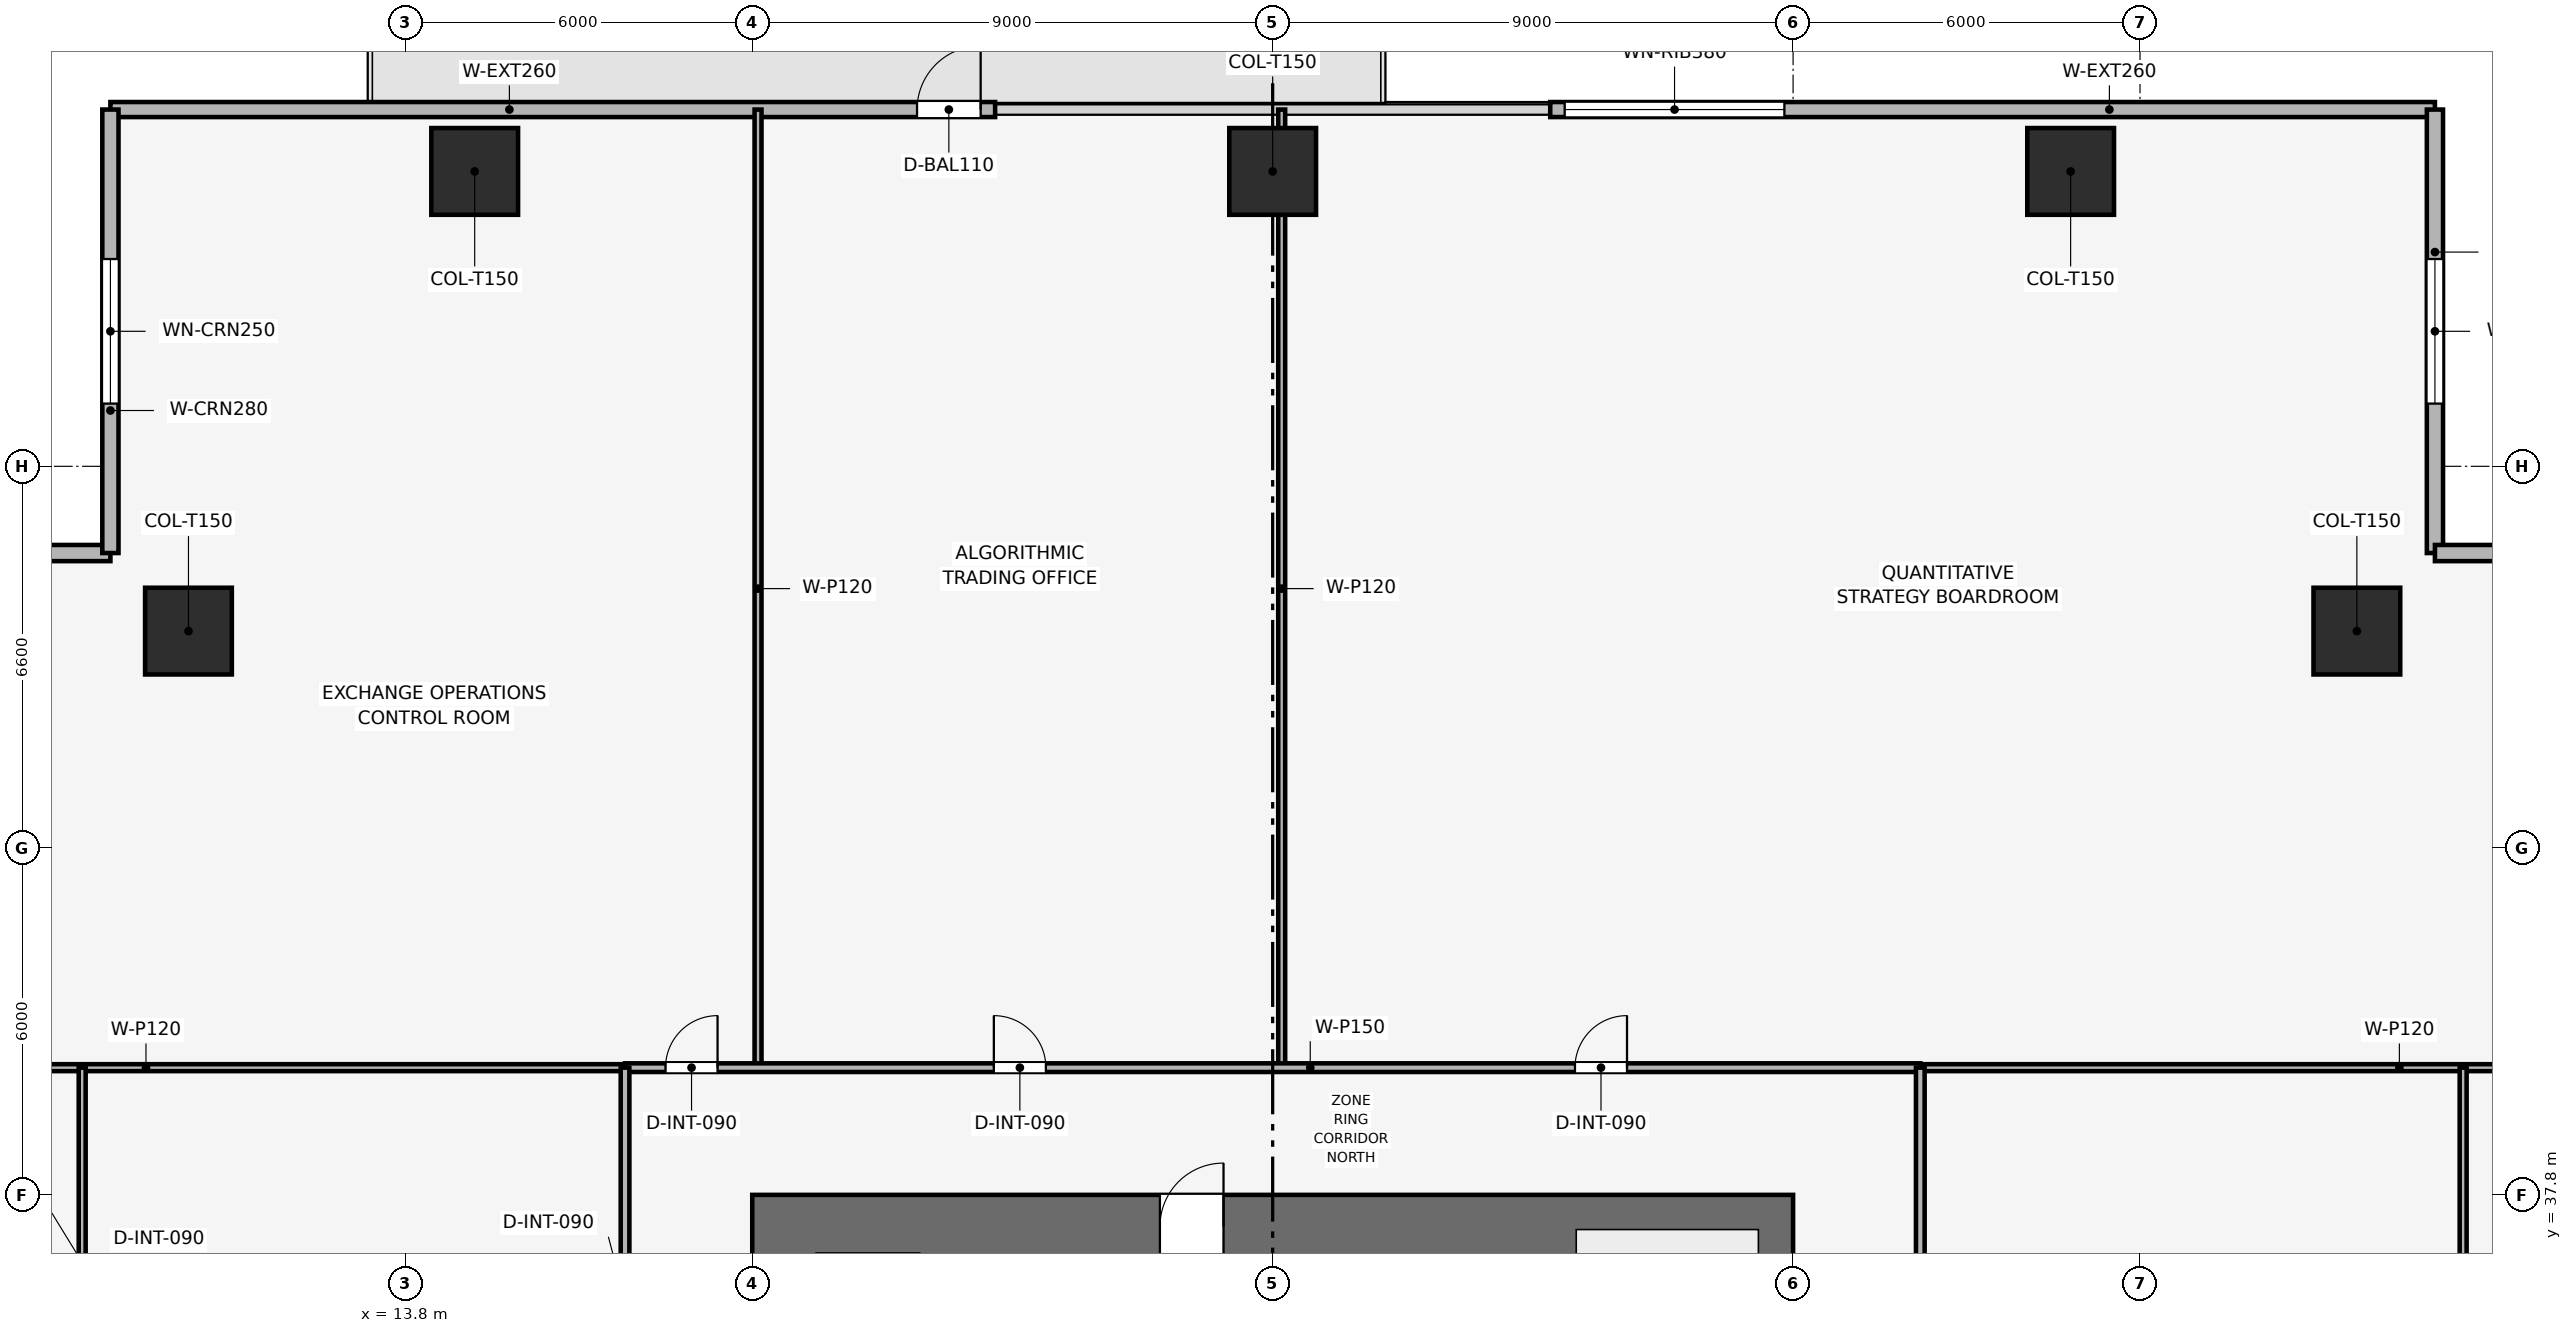
"""IFC4 building model, lengths in metres.
Left out: names, types, materials, properties, quantities, classifications, styles, units other than length and angle.
Written with IfcOpenShell. Run it as: python <this file> out.ifc"""

import sys

from ifc_helpers import new_model, si_unit, direction, frame, frame_2d, origin, origin_2d, place, context, subcontext, project, spatial, rectangle, extrude, element, fill, save


model = new_model("IFC4")
c1 = context("Model", 3, precision=1e-05, world=origin(), true_north=direction((0.0, 1.0)))
c2 = subcontext(c1, "Body", "Model", "MODEL_VIEW")
j1 = project(units=[si_unit("LENGTHUNIT", "METRE"), si_unit("PLANEANGLEUNIT", "RADIAN")], contexts=[c1])
p1 = place(None, origin())
s1 = spatial("IfcSite", under=j1, at=p1, CompositionType="ELEMENT")
p2 = place(p1, origin())
s2 = spatial("IfcBuilding", under=s1, at=p2, CompositionType="ELEMENT")
p3 = place(p2, frame((0.0, 0.0, 80.7)))
s3 = spatial("IfcBuildingStorey", under=s2, at=p3, CompositionType="ELEMENT", Elevation=80.7)
p4 = place(p3, frame((19.8, 37.25, 0.0), z_axis=(0.0, 0.0, 1.0), x_axis=(1.0, 0.0, 0.0)))
e1 = element("IfcWall", 1, at=p4, inside=s3, PredefinedType="SHEAR", context=c2, shape_type="SweptSolid", body=[
    extrude(rectangle(XDim=18.0, YDim=1.1, at=frame_2d((9.0, 0.0))), origin(), (0.0, 0.0, 1.0), 3.9),
])
p5 = place(p4, frame((7.05, 0.0, 0.0)))
e2 = element("IfcOpeningElement", 2, at=p5, cuts=e1, PredefinedType="OPENING", context=c2, shape_type="SweptSolid", body=[
    extrude(rectangle(XDim=1.1, YDim=2.15, at=frame_2d((0.55, 1.075))), frame((0.0, 0.56, 0.0), z_axis=(0.0, -1.0, 0.0), x_axis=(1.0, 0.0, 0.0)), (0.0, 0.0, 1.0), 1.12),
])
for number, where, z_axis, x_axis in (
    (3, (42.6, 55.5, 0.003), (0.0, 0.0, 1.0), (1.0, 0.0, 0.0)),
    (4, (28.8, 55.5, 0.003), (0.0, 0.0, 1.0), (1.0, 0.0, 0.0)),
    (5, (15.0, 55.5, 0.003), (0.0, 0.0, 1.0), (1.0, 0.0, 0.0)),
    (6, (47.55, 47.55, 0.003), (0.0, 0.0, 1.0), (1.0, 0.0, 0.0)),
    (7, (10.05, 47.55, 0.003), (0.0, 0.0, 1.0), (1.0, 0.0, 0.0)),
):
    element("IfcColumn", number, at=place(p3, frame(where, z_axis=z_axis, x_axis=x_axis)), inside=s3, PredefinedType="COLUMN", context=c2, shape_type="SweptSolid", body=[
        extrude(rectangle(XDim=1.5, YDim=1.5, at=origin_2d()), origin(), (0.0, 0.0, 1.0), 3.644),
    ])
p6 = place(p3, frame((8.7, 56.57, 0.0), z_axis=(0.0, 0.0, 1.0), x_axis=(1.0, 0.0, 0.0)))
e8 = element("IfcWall", 8, at=p6, inside=s3, PredefinedType="SOLIDWALL", context=c2, shape_type="SweptSolid", body=[
    extrude(rectangle(XDim=15.3, YDim=0.26, at=frame_2d((7.65, 0.0))), origin(), (0.0, 0.0, 1.0), 3.65),
])
p7 = place(p6, frame((13.95, 0.0, 0.0)))
e9 = element("IfcOpeningElement", 9, at=p7, cuts=e8, PredefinedType="OPENING", context=c2, shape_type="SweptSolid", body=[
    extrude(rectangle(XDim=1.1, YDim=2.2, at=frame_2d((0.55, 1.1))), frame((0.0, 0.14, 0.0), z_axis=(0.0, -1.0, 0.0), x_axis=(1.0, 0.0, 0.0)), (0.0, 0.0, 1.0), 0.28),
])
p8 = place(p3, frame((33.6, 56.57, 0.0), z_axis=(0.0, 0.0, 1.0), x_axis=(1.0, 0.0, 0.0)))
e10 = element("IfcWall", 10, at=p8, inside=s3, PredefinedType="SOLIDWALL", context=c2, shape_type="SweptSolid", body=[
    extrude(rectangle(XDim=15.3, YDim=0.26, at=frame_2d((7.65, 0.0))), origin(), (0.0, 0.0, 1.0), 3.65),
])
p9 = place(p8, frame((0.25, 0.0, 0.9)))
e11 = element("IfcOpeningElement", 11, at=p9, cuts=e10, PredefinedType="OPENING", context=c2, shape_type="SweptSolid", body=[
    extrude(rectangle(XDim=3.8, YDim=1.9, at=frame_2d((1.9, 0.95))), frame((0.0, 0.14, 0.0), z_axis=(0.0, -1.0, 0.0), x_axis=(1.0, 0.0, 0.0)), (0.0, 0.0, 1.0), 0.28),
])
p10 = place(p3, frame((1.03, 48.9, 0.0), z_axis=(0.0, 0.0, 1.0), x_axis=(1.0, 0.0, 0.0)))
e12 = element("IfcWall", 12, at=p10, inside=s3, PredefinedType="SOLIDWALL", context=c2, shape_type="SweptSolid", body=[
    extrude(rectangle(XDim=7.67, YDim=0.28, at=frame_2d((3.835, 0.0))), origin(), (0.0, 0.0, 1.0), 3.65),
])
p11 = place(p10, frame((2.585, 0.0, 0.9)))
e13 = element("IfcOpeningElement", 13, at=p11, cuts=e12, PredefinedType="OPENING", context=c2, shape_type="SweptSolid", body=[
    extrude(rectangle(XDim=2.5, YDim=1.9, at=frame_2d((1.25, 0.95))), frame((0.0, 0.15, 0.0), z_axis=(0.0, -1.0, 0.0), x_axis=(1.0, 0.0, 0.0)), (0.0, 0.0, 1.0), 0.3),
])
p12 = place(p3, frame((8.7, 48.9, 0.0), z_axis=(0.0, 0.0, 1.0), x_axis=(0.0, 1.0, 0.0)))
e14 = element("IfcWall", 14, at=p12, inside=s3, PredefinedType="SOLIDWALL", context=c2, shape_type="SweptSolid", body=[
    extrude(rectangle(XDim=7.67, YDim=0.28, at=frame_2d((3.835, 0.0))), origin(), (0.0, 0.0, 1.0), 3.65),
])
p13 = place(p12, frame((2.585, 0.0, 0.9)))
e15 = element("IfcOpeningElement", 15, at=p13, cuts=e14, PredefinedType="OPENING", context=c2, shape_type="SweptSolid", body=[
    extrude(rectangle(XDim=2.5, YDim=1.9, at=frame_2d((1.25, 0.95))), frame((0.0, 0.15, 0.0), z_axis=(0.0, -1.0, 0.0), x_axis=(1.0, 0.0, 0.0)), (0.0, 0.0, 1.0), 0.3),
])
p14 = place(p3, frame((48.9, 56.57, 0.0), z_axis=(0.0, 0.0, 1.0), x_axis=(0.0, -1.0, 0.0)))
e16 = element("IfcWall", 16, at=p14, inside=s3, PredefinedType="SOLIDWALL", context=c2, shape_type="SweptSolid", body=[
    extrude(rectangle(XDim=7.67, YDim=0.28, at=frame_2d((3.835, 0.0))), origin(), (0.0, 0.0, 1.0), 3.65),
])
p15 = place(p14, frame((2.585, 0.0, 0.9)))
e17 = element("IfcOpeningElement", 17, at=p15, cuts=e16, PredefinedType="OPENING", context=c2, shape_type="SweptSolid", body=[
    extrude(rectangle(XDim=2.5, YDim=1.9, at=frame_2d((1.25, 0.95))), frame((0.0, 0.15, 0.0), z_axis=(0.0, -1.0, 0.0), x_axis=(1.0, 0.0, 0.0)), (0.0, 0.0, 1.0), 0.3),
])
p16 = place(p3, frame((48.9, 48.9, 0.0), z_axis=(0.0, 0.0, 1.0), x_axis=(1.0, 0.0, 0.0)))
e18 = element("IfcWall", 18, at=p16, inside=s3, PredefinedType="SOLIDWALL", context=c2, shape_type="SweptSolid", body=[
    extrude(rectangle(XDim=7.67, YDim=0.28, at=frame_2d((3.835, 0.0))), origin(), (0.0, 0.0, 1.0), 3.65),
])
p17 = place(p16, frame((2.585, 0.0, 0.9)))
e19 = element("IfcOpeningElement", 19, at=p17, cuts=e18, PredefinedType="OPENING", context=c2, shape_type="SweptSolid", body=[
    extrude(rectangle(XDim=2.5, YDim=1.9, at=frame_2d((1.25, 0.95))), frame((0.0, 0.15, 0.0), z_axis=(0.0, -1.0, 0.0), x_axis=(1.0, 0.0, 0.0)), (0.0, 0.0, 1.0), 0.3),
])
for number, where, z_axis, x_axis in (
    (20, (19.9, 40.0, 0.0), (0.0, 0.0, 1.0), (0.0, 1.0, 0.0)),
    (21, (28.956, 40.0, 0.0), (0.0, 0.0, 1.0), (0.0, 1.0, 0.0)),
    (22, (1.03, 40.0, 0.0), (0.0, 0.0, 1.0), (1.0, 0.0, 0.0)),
    (23, (40.0, 40.0, 0.0), (0.0, 0.0, 1.0), (1.0, 0.0, 0.0)),
):
    element("IfcWall", number, at=place(p3, frame(where, z_axis=z_axis, x_axis=x_axis)), inside=s3, PredefinedType="PARTITIONING", context=c2, shape_type="SweptSolid", body=[
        extrude(rectangle(XDim=16.57, YDim=0.12, at=frame_2d((8.285, 0.0))), origin(), (0.0, 0.0, 1.0), 2.935),
    ])
p18 = place(p3, frame((8.212, 31.962, 0.0), z_axis=(0.0, 0.0, 1.0), x_axis=(0.0, 1.0, 0.0)))
e24 = element("IfcWall", 24, at=p18, inside=s3, PredefinedType="PARTITIONING", context=c2, shape_type="SweptSolid", body=[
    extrude(rectangle(XDim=8.038, YDim=0.12, at=frame_2d((4.019, 0.0))), origin(), (0.0, 0.0, 1.0), 3.085),
])
p19 = place(p18, frame((3.288, 0.0, 0.0)))
e25 = element("IfcOpeningElement", 25, at=p19, cuts=e24, PredefinedType="OPENING", context=c2, shape_type="SweptSolid", body=[
    extrude(rectangle(XDim=0.9, YDim=2.1, at=frame_2d((0.45, 1.05))), frame((0.0, 0.07, 0.0), z_axis=(0.0, -1.0, 0.0), x_axis=(1.0, 0.0, 0.0)), (0.0, 0.0, 1.0), 0.14),
])
p20 = place(p3, frame((49.388, 17.6, 0.0), z_axis=(0.0, 0.0, 1.0), x_axis=(0.0, 1.0, 0.0)))
e26 = element("IfcWall", 26, at=p20, inside=s3, PredefinedType="PARTITIONING", context=c2, shape_type="SweptSolid", body=[
    extrude(rectangle(XDim=22.4, YDim=0.12, at=frame_2d((11.2, 0.0))), origin(), (0.0, 0.0, 1.0), 3.085),
])
p21 = place(p20, frame((17.783, 0.0, 0.0)))
e27 = element("IfcOpeningElement", 27, at=p21, cuts=e26, PredefinedType="OPENING", context=c2, shape_type="SweptSolid", body=[
    extrude(rectangle(XDim=0.9, YDim=2.1, at=frame_2d((0.45, 1.05))), frame((0.0, 0.07, 0.0), z_axis=(0.0, -1.0, 0.0), x_axis=(1.0, 0.0, 0.0)), (0.0, 0.0, 1.0), 0.14),
])
p22 = place(p3, frame((17.6, 40.0, 0.0), z_axis=(0.0, 0.0, 1.0), x_axis=(1.0, 0.0, 0.0)))
e28 = element("IfcWall", 28, at=p22, inside=s3, PredefinedType="PARTITIONING", context=c2, shape_type="SweptSolid", body=[
    extrude(rectangle(XDim=22.4, YDim=0.15, at=frame_2d((11.2, 0.0))), origin(), (0.0, 0.0, 1.0), 3.085),
])
p23 = place(p22, frame((0.7, 0.0, 0.0)))
e29 = element("IfcOpeningElement", 29, at=p23, cuts=e28, PredefinedType="OPENING", context=c2, shape_type="SweptSolid", body=[
    extrude(rectangle(XDim=0.9, YDim=2.1, at=frame_2d((0.45, 1.05))), frame((0.0, 0.085, 0.0), z_axis=(0.0, -1.0, 0.0), x_axis=(1.0, 0.0, 0.0)), (0.0, 0.0, 1.0), 0.17),
])
p24 = place(p22, frame((6.378, 0.0, 0.0)))
e30 = element("IfcOpeningElement", 30, at=p24, cuts=e28, PredefinedType="OPENING", context=c2, shape_type="SweptSolid", body=[
    extrude(rectangle(XDim=0.9, YDim=2.1, at=frame_2d((0.45, 1.05))), frame((0.0, 0.085, 0.0), z_axis=(0.0, -1.0, 0.0), x_axis=(1.0, 0.0, 0.0)), (0.0, 0.0, 1.0), 0.17),
])
p25 = place(p22, frame((16.428, 0.0, 0.0)))
e31 = element("IfcOpeningElement", 31, at=p25, cuts=e28, PredefinedType="OPENING", context=c2, shape_type="SweptSolid", body=[
    extrude(rectangle(XDim=0.9, YDim=2.1, at=frame_2d((0.45, 1.05))), frame((0.0, 0.085, 0.0), z_axis=(0.0, -1.0, 0.0), x_axis=(1.0, 0.0, 0.0)), (0.0, 0.0, 1.0), 0.17),
])
p26 = place(p3, frame((17.6, 17.6, 0.0), z_axis=(0.0, 0.0, 1.0), x_axis=(0.0, 1.0, 0.0)))
e32 = element("IfcWall", 32, at=p26, inside=s3, PredefinedType="PARTITIONING", context=c2, shape_type="SweptSolid", body=[
    extrude(rectangle(XDim=22.4, YDim=0.15, at=frame_2d((11.2, 0.0))), origin(), (0.0, 0.0, 1.0), 3.085),
])
p27 = place(p26, frame((0.707, 0.0, 0.0)))
e33 = element("IfcOpeningElement", 33, at=p27, cuts=e32, PredefinedType="OPENING", context=c2, shape_type="SweptSolid", body=[
    extrude(rectangle(XDim=0.9, YDim=2.1, at=frame_2d((0.45, 1.05))), frame((0.0, 0.085, 0.0), z_axis=(0.0, -1.0, 0.0), x_axis=(1.0, 0.0, 0.0)), (0.0, 0.0, 1.0), 0.17),
])
p28 = place(p26, frame((4.745, 0.0, 0.0)))
e34 = element("IfcOpeningElement", 34, at=p28, cuts=e32, PredefinedType="OPENING", context=c2, shape_type="SweptSolid", body=[
    extrude(rectangle(XDim=0.9, YDim=2.1, at=frame_2d((0.45, 1.05))), frame((0.0, 0.085, 0.0), z_axis=(0.0, -1.0, 0.0), x_axis=(1.0, 0.0, 0.0)), (0.0, 0.0, 1.0), 0.17),
])
p29 = place(p26, frame((10.769, 0.0, 0.0)))
e35 = element("IfcOpeningElement", 35, at=p29, cuts=e32, PredefinedType="OPENING", context=c2, shape_type="SweptSolid", body=[
    extrude(rectangle(XDim=0.9, YDim=2.1, at=frame_2d((0.45, 1.05))), frame((0.0, 0.085, 0.0), z_axis=(0.0, -1.0, 0.0), x_axis=(1.0, 0.0, 0.0)), (0.0, 0.0, 1.0), 0.17),
])
p30 = place(p26, frame((17.931, 0.0, 0.0)))
e36 = element("IfcOpeningElement", 36, at=p30, cuts=e32, PredefinedType="OPENING", context=c2, shape_type="SweptSolid", body=[
    extrude(rectangle(XDim=0.9, YDim=2.1, at=frame_2d((0.45, 1.05))), frame((0.0, 0.085, 0.0), z_axis=(0.0, -1.0, 0.0), x_axis=(1.0, 0.0, 0.0)), (0.0, 0.0, 1.0), 0.17),
])
p31 = place(p3, frame((40.0, 17.6, 0.0), z_axis=(0.0, 0.0, 1.0), x_axis=(0.0, 1.0, 0.0)))
e37 = element("IfcWall", 37, at=p31, inside=s3, PredefinedType="PARTITIONING", context=c2, shape_type="SweptSolid", body=[
    extrude(rectangle(XDim=22.4, YDim=0.15, at=frame_2d((11.2, 0.0))), origin(), (0.0, 0.0, 1.0), 3.085),
])
p32 = place(p31, frame((10.75, 0.0, 0.0)))
e38 = element("IfcOpeningElement", 38, at=p32, cuts=e37, PredefinedType="OPENING", context=c2, shape_type="SweptSolid", body=[
    extrude(rectangle(XDim=0.9, YDim=2.1, at=frame_2d((0.45, 1.05))), frame((0.0, 0.085, 0.0), z_axis=(0.0, -1.0, 0.0), x_axis=(1.0, 0.0, 0.0)), (0.0, 0.0, 1.0), 0.17),
])
p33 = place(p7, origin())
e39 = element("IfcDoor", 39, at=p33, inside=s3, OperationType="SINGLE_SWING_RIGHT", PredefinedType="DOOR", context=c2, shape_type="SweptSolid", body=[
    extrude(rectangle(XDim=1.1, YDim=2.2, at=frame_2d((0.55, 1.1))), frame((0.0, 0.025, 0.0), z_axis=(0.0, -1.0, 0.0), x_axis=(1.0, 0.0, 0.0)), (0.0, 0.0, 1.0), 0.05),
])
fill(e9, e39)
p34 = place(p9, origin())
e40 = element("IfcWindow", 40, at=p34, inside=s3, PartitioningType="SINGLE_PANEL", PredefinedType="WINDOW", context=c2, shape_type="SweptSolid", body=[
    extrude(rectangle(XDim=3.8, YDim=1.9, at=frame_2d((1.9, 0.95))), frame((0.0, 0.03, 0.0), z_axis=(0.0, -1.0, 0.0), x_axis=(1.0, 0.0, 0.0)), (0.0, 0.0, 1.0), 0.06),
])
fill(e11, e40)
p35 = place(p13, origin())
e41 = element("IfcWindow", 41, at=p35, inside=s3, PartitioningType="SINGLE_PANEL", PredefinedType="WINDOW", context=c2, shape_type="SweptSolid", body=[
    extrude(rectangle(XDim=2.5, YDim=1.9, at=frame_2d((1.25, 0.95))), frame((0.0, 0.03, 0.0), z_axis=(0.0, -1.0, 0.0), x_axis=(1.0, 0.0, 0.0)), (0.0, 0.0, 1.0), 0.06),
])
fill(e15, e41)
p36 = place(p15, origin())
e42 = element("IfcWindow", 42, at=p36, inside=s3, PartitioningType="SINGLE_PANEL", PredefinedType="WINDOW", context=c2, shape_type="SweptSolid", body=[
    extrude(rectangle(XDim=2.5, YDim=1.9, at=frame_2d((1.25, 0.95))), frame((0.0, 0.03, 0.0), z_axis=(0.0, -1.0, 0.0), x_axis=(1.0, 0.0, 0.0)), (0.0, 0.0, 1.0), 0.06),
])
fill(e17, e42)
p37 = place(p23, origin())
e43 = element("IfcDoor", 43, at=p37, inside=s3, OperationType="SINGLE_SWING_RIGHT", PredefinedType="DOOR", context=c2, shape_type="SweptSolid", body=[
    extrude(rectangle(XDim=0.9, YDim=2.1, at=frame_2d((0.45, 1.05))), frame((0.0, 0.025, 0.0), z_axis=(0.0, -1.0, 0.0), x_axis=(1.0, 0.0, 0.0)), (0.0, 0.0, 1.0), 0.05),
])
fill(e29, e43)
p38 = place(p24, origin())
e44 = element("IfcDoor", 44, at=p38, inside=s3, OperationType="SINGLE_SWING_LEFT", PredefinedType="DOOR", context=c2, shape_type="SweptSolid", body=[
    extrude(rectangle(XDim=0.9, YDim=2.1, at=frame_2d((0.45, 1.05))), frame((0.0, 0.025, 0.0), z_axis=(0.0, -1.0, 0.0), x_axis=(1.0, 0.0, 0.0)), (0.0, 0.0, 1.0), 0.05),
])
fill(e30, e44)
p39 = place(p25, origin())
e45 = element("IfcDoor", 45, at=p39, inside=s3, OperationType="SINGLE_SWING_RIGHT", PredefinedType="DOOR", context=c2, shape_type="SweptSolid", body=[
    extrude(rectangle(XDim=0.9, YDim=2.1, at=frame_2d((0.45, 1.05))), frame((0.0, 0.025, 0.0), z_axis=(0.0, -1.0, 0.0), x_axis=(1.0, 0.0, 0.0)), (0.0, 0.0, 1.0), 0.05),
])
fill(e31, e45)
p40 = place(p5, origin())
e46 = element("IfcDoor", 46, at=p40, inside=s3, OperationType="SINGLE_SWING_RIGHT", PredefinedType="DOOR", context=c2, shape_type="SweptSolid", body=[
    extrude(rectangle(XDim=1.1, YDim=2.15, at=frame_2d((0.55, 1.075))), frame((0.0, 0.025, 0.0), z_axis=(0.0, -1.0, 0.0), x_axis=(1.0, 0.0, 0.0)), (0.0, 0.0, 1.0), 0.05),
])
fill(e2, e46)
save(model, sys.argv[1])
